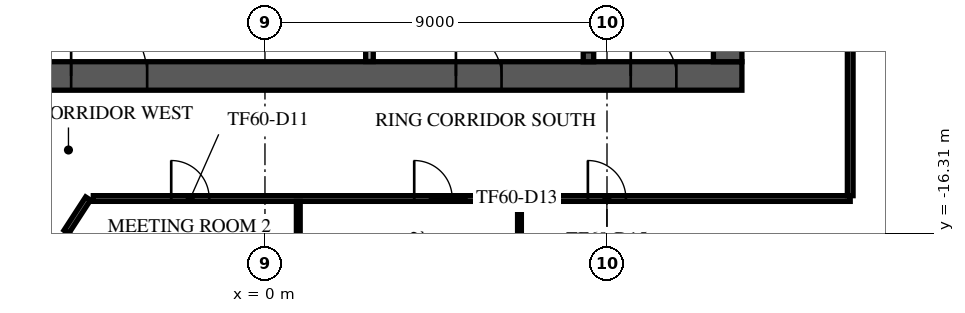
"""IFC4 building model, lengths in metres.
Left out: names, types, materials, properties, quantities, classifications, styles, units other than length and angle.
Written with IfcOpenShell. Run it as: python <this file> out.ifc"""

import sys

from ifc_helpers import new_model, si_unit, direction, frame, frame_2d, origin, place, context, subcontext, project, spatial, rectangle, extrude, element, fill, save


model = new_model("IFC4")
c1 = context("Model", 3, precision=1e-05, world=origin(), true_north=direction((0.0, 1.0)))
c2 = subcontext(c1, "Body", "Model", "MODEL_VIEW")
j1 = project(units=[si_unit("LENGTHUNIT", "METRE"), si_unit("PLANEANGLEUNIT", "RADIAN")], contexts=[c1])
p1 = place(None, origin())
s1 = spatial("IfcSite", under=j1, at=p1, CompositionType="ELEMENT")
p2 = place(p1, origin())
s2 = spatial("IfcBuilding", under=s1, at=p2, CompositionType="ELEMENT")
p3 = place(p2, frame((0.0, 0.0, 254.9)))
s3 = spatial("IfcBuildingStorey", under=s2, at=p3, CompositionType="ELEMENT", Elevation=254.9)
p4 = place(p3, frame((-12.55, -12.175, 0.0), z_axis=(0.0, 0.0, 1.0), x_axis=(1.0, 0.0, 0.0)))
e1 = element("IfcWall", 1, at=p4, inside=s3, PredefinedType="SHEAR", context=c2, shape_type="SweptSolid", body=[
    extrude(rectangle(XDim=25.1, YDim=0.75, at=frame_2d((12.55, 0.0))), origin(), (0.0, 0.0, 1.0), 3.64),
])
p5 = place(p4, frame((7.45, 0.0, 0.0)))
e2 = element("IfcOpeningElement", 2, at=p5, cuts=e1, PredefinedType="OPENING", context=c2, shape_type="SweptSolid", body=[
    extrude(rectangle(XDim=2.0, YDim=2.1, at=frame_2d((1.0, 1.05))), frame((0.0, 0.385, 0.0), z_axis=(0.0, -1.0, 0.0), x_axis=(1.0, 0.0, 0.0)), (0.0, 0.0, 1.0), 0.77),
])
p6 = place(p4, frame((17.575, 0.0, 0.0)))
e3 = element("IfcOpeningElement", 3, at=p6, cuts=e1, PredefinedType="OPENING", context=c2, shape_type="SweptSolid", body=[
    extrude(rectangle(XDim=1.2, YDim=2.1, at=frame_2d((0.6, 1.05))), frame((0.0, 0.385, 0.0), z_axis=(0.0, -1.0, 0.0), x_axis=(1.0, 0.0, 0.0)), (0.0, 0.0, 1.0), 0.77),
])
p7 = place(p4, frame((1.725, 0.0, 0.0)))
e4 = element("IfcOpeningElement", 4, at=p7, cuts=e1, PredefinedType="OPENING", context=c2, shape_type="SweptSolid", body=[
    extrude(rectangle(XDim=1.2, YDim=2.1, at=frame_2d((0.6, 1.05))), frame((0.0, 0.385, 0.0), z_axis=(0.0, -1.0, 0.0), x_axis=(1.0, 0.0, 0.0)), (0.0, 0.0, 1.0), 0.77),
])
p8 = place(p4, frame((22.175, 0.0, 0.0)))
e5 = element("IfcOpeningElement", 5, at=p8, cuts=e1, PredefinedType="OPENING", context=c2, shape_type="SweptSolid", body=[
    extrude(rectangle(XDim=1.2, YDim=2.1, at=frame_2d((0.6, 1.05))), frame((0.0, 0.385, 0.0), z_axis=(0.0, -1.0, 0.0), x_axis=(1.0, 0.0, 0.0)), (0.0, 0.0, 1.0), 0.77),
])
p9 = place(p3, frame((12.175, -11.8, 0.0), z_axis=(0.0, 0.0, 1.0), x_axis=(0.0, 1.0, 0.0)))
e6 = element("IfcWall", 6, at=p9, inside=s3, PredefinedType="SHEAR", context=c2, shape_type="SweptSolid", body=[
    extrude(rectangle(XDim=23.6, YDim=0.75, at=frame_2d((11.8, 0.0))), origin(), (0.0, 0.0, 1.0), 3.64),
])
p10 = place(p9, frame((10.6, 0.0, 0.0)))
e7 = element("IfcOpeningElement", 7, at=p10, cuts=e6, PredefinedType="OPENING", context=c2, shape_type="SweptSolid", body=[
    extrude(rectangle(XDim=2.4, YDim=2.4, at=frame_2d((1.2, 1.2))), frame((0.0, 0.385, 0.0), z_axis=(0.0, -1.0, 0.0), x_axis=(1.0, 0.0, 0.0)), (0.0, 0.0, 1.0), 0.77),
])
p11 = place(p3, frame((8.512, -4.55, 0.0), z_axis=(0.0, 0.0, 1.0), x_axis=(0.0, -1.0, 0.0)))
e8 = element("IfcWall", 8, at=p11, inside=s3, PredefinedType="SOLIDWALL", context=c2, shape_type="SweptSolid", body=[
    extrude(rectangle(XDim=7.25, YDim=0.275, at=frame_2d((3.625, 0.0))), origin(), (0.0, 0.0, 1.0), 3.64),
])
p12 = place(p11, frame((6.0, 0.0, 0.0)))
e9 = element("IfcOpeningElement", 9, at=p12, cuts=e8, PredefinedType="OPENING", context=c2, shape_type="SweptSolid", body=[
    extrude(rectangle(XDim=1.0, YDim=2.1, at=frame_2d((0.5, 1.05))), frame((0.0, 0.147, 0.0), z_axis=(0.0, -1.0, 0.0), x_axis=(1.0, 0.0, 0.0)), (0.0, 0.0, 1.0), 0.295),
])
p13 = place(p3, frame((2.75, -11.795, 0.0), z_axis=(0.0, 0.0, 1.0), x_axis=(0.0, 1.0, 0.0)))
e10 = element("IfcWall", 10, at=p13, inside=s3, PredefinedType="PARTITIONING", context=c2, shape_type="SweptSolid", body=[
    extrude(rectangle(XDim=2.99, YDim=0.2, at=frame_2d((1.495, 0.0))), origin(), (0.0, 0.0, 1.0), 3.64),
])
p14 = place(p3, frame((-31.308, -15.082, 0.0), z_axis=(0.0, 0.0, 1.0), x_axis=(0.838671071298, -0.54463825992, 0.0)))
e11 = element("IfcWall", 11, at=p14, inside=s3, PredefinedType="STANDARD", context=c2, shape_type="SweptSolid", body=[
    extrude(rectangle(XDim=36.086, YDim=0.6, at=frame_2d((18.043, 0.0))), origin(), (0.0, 0.0, 1.0), 3.64),
])
p15 = place(p14, frame((1.205, 0.0, 0.9)))
e12 = element("IfcOpeningElement", 12, at=p15, cuts=e11, PredefinedType="OPENING", context=c2, shape_type="SweptSolid", body=[
    extrude(rectangle(XDim=2.1, YDim=2.1, at=frame_2d((1.05, 1.05))), frame((0.0, 0.31, 0.0), z_axis=(0.0, -1.0, 0.0), x_axis=(1.0, 0.0, 0.0)), (0.0, 0.0, 1.0), 0.62),
])
p16 = place(p14, frame((5.716, 0.0, 0.9)))
e13 = element("IfcOpeningElement", 13, at=p16, cuts=e11, PredefinedType="OPENING", context=c2, shape_type="SweptSolid", body=[
    extrude(rectangle(XDim=2.1, YDim=2.1, at=frame_2d((1.05, 1.05))), frame((0.0, 0.31, 0.0), z_axis=(0.0, -1.0, 0.0), x_axis=(1.0, 0.0, 0.0)), (0.0, 0.0, 1.0), 0.62),
])
p17 = place(p14, frame((10.227, 0.0, 0.9)))
e14 = element("IfcOpeningElement", 14, at=p17, cuts=e11, PredefinedType="OPENING", context=c2, shape_type="SweptSolid", body=[
    extrude(rectangle(XDim=2.1, YDim=2.1, at=frame_2d((1.05, 1.05))), frame((0.0, 0.31, 0.0), z_axis=(0.0, -1.0, 0.0), x_axis=(1.0, 0.0, 0.0)), (0.0, 0.0, 1.0), 0.62),
])
p18 = place(p14, frame((14.738, 0.0, 0.9)))
e15 = element("IfcOpeningElement", 15, at=p18, cuts=e11, PredefinedType="OPENING", context=c2, shape_type="SweptSolid", body=[
    extrude(rectangle(XDim=2.1, YDim=2.1, at=frame_2d((1.05, 1.05))), frame((0.0, 0.31, 0.0), z_axis=(0.0, -1.0, 0.0), x_axis=(1.0, 0.0, 0.0)), (0.0, 0.0, 1.0), 0.62),
])
p19 = place(p14, frame((19.249, 0.0, 0.9)))
e16 = element("IfcOpeningElement", 16, at=p19, cuts=e11, PredefinedType="OPENING", context=c2, shape_type="SweptSolid", body=[
    extrude(rectangle(XDim=2.1, YDim=2.1, at=frame_2d((1.05, 1.05))), frame((0.0, 0.31, 0.0), z_axis=(0.0, -1.0, 0.0), x_axis=(1.0, 0.0, 0.0)), (0.0, 0.0, 1.0), 0.62),
])
p20 = place(p14, frame((23.759, 0.0, 0.9)))
e17 = element("IfcOpeningElement", 17, at=p20, cuts=e11, PredefinedType="OPENING", context=c2, shape_type="SweptSolid", body=[
    extrude(rectangle(XDim=2.1, YDim=2.1, at=frame_2d((1.05, 1.05))), frame((0.0, 0.31, 0.0), z_axis=(0.0, -1.0, 0.0), x_axis=(1.0, 0.0, 0.0)), (0.0, 0.0, 1.0), 0.62),
])
p21 = place(p14, frame((28.27, 0.0, 0.9)))
e18 = element("IfcOpeningElement", 18, at=p21, cuts=e11, PredefinedType="OPENING", context=c2, shape_type="SweptSolid", body=[
    extrude(rectangle(XDim=2.1, YDim=2.1, at=frame_2d((1.05, 1.05))), frame((0.0, 0.31, 0.0), z_axis=(0.0, -1.0, 0.0), x_axis=(1.0, 0.0, 0.0)), (0.0, 0.0, 1.0), 0.62),
])
p22 = place(p14, frame((32.781, 0.0, 0.9)))
e19 = element("IfcOpeningElement", 19, at=p22, cuts=e11, PredefinedType="OPENING", context=c2, shape_type="SweptSolid", body=[
    extrude(rectangle(XDim=2.1, YDim=2.1, at=frame_2d((1.05, 1.05))), frame((0.0, 0.31, 0.0), z_axis=(0.0, -1.0, 0.0), x_axis=(1.0, 0.0, 0.0)), (0.0, 0.0, 1.0), 0.62),
])
p23 = place(p3, frame((6.367, -33.16, 0.0), z_axis=(0.0, 0.0, 1.0), x_axis=(0.544637371147, 0.838671648472, 0.0)))
e20 = element("IfcWall", 20, at=p23, inside=s3, PredefinedType="STANDARD", context=c2, shape_type="SweptSolid", body=[
    extrude(rectangle(XDim=48.686, YDim=0.6, at=frame_2d((24.343, 0.0))), origin(), (0.0, 0.0, 1.0), 3.64),
])
p24 = place(p23, frame((1.213, 0.0, 0.9)))
e21 = element("IfcOpeningElement", 21, at=p24, cuts=e20, PredefinedType="OPENING", context=c2, shape_type="SweptSolid", body=[
    extrude(rectangle(XDim=2.0, YDim=2.1, at=frame_2d((1.0, 1.05))), frame((0.0, 0.31, 0.0), z_axis=(0.0, -1.0, 0.0), x_axis=(1.0, 0.0, 0.0)), (0.0, 0.0, 1.0), 0.62),
])
p25 = place(p23, frame((5.639, 0.0, 0.9)))
e22 = element("IfcOpeningElement", 22, at=p25, cuts=e20, PredefinedType="OPENING", context=c2, shape_type="SweptSolid", body=[
    extrude(rectangle(XDim=2.0, YDim=2.1, at=frame_2d((1.0, 1.05))), frame((0.0, 0.31, 0.0), z_axis=(0.0, -1.0, 0.0), x_axis=(1.0, 0.0, 0.0)), (0.0, 0.0, 1.0), 0.62),
])
p26 = place(p23, frame((14.491, 0.0, 0.9)))
e23 = element("IfcOpeningElement", 23, at=p26, cuts=e20, PredefinedType="OPENING", context=c2, shape_type="SweptSolid", body=[
    extrude(rectangle(XDim=2.0, YDim=2.1, at=frame_2d((1.0, 1.05))), frame((0.0, 0.31, 0.0), z_axis=(0.0, -1.0, 0.0), x_axis=(1.0, 0.0, 0.0)), (0.0, 0.0, 1.0), 0.62),
])
p27 = place(p23, frame((18.917, 0.0, 0.9)))
e24 = element("IfcOpeningElement", 24, at=p27, cuts=e20, PredefinedType="OPENING", context=c2, shape_type="SweptSolid", body=[
    extrude(rectangle(XDim=2.0, YDim=2.1, at=frame_2d((1.0, 1.05))), frame((0.0, 0.31, 0.0), z_axis=(0.0, -1.0, 0.0), x_axis=(1.0, 0.0, 0.0)), (0.0, 0.0, 1.0), 0.62),
])
p28 = place(p23, frame((23.343, 0.0, 0.9)))
e25 = element("IfcOpeningElement", 25, at=p28, cuts=e20, PredefinedType="OPENING", context=c2, shape_type="SweptSolid", body=[
    extrude(rectangle(XDim=2.0, YDim=2.1, at=frame_2d((1.0, 1.05))), frame((0.0, 0.31, 0.0), z_axis=(0.0, -1.0, 0.0), x_axis=(1.0, 0.0, 0.0)), (0.0, 0.0, 1.0), 0.62),
])
p29 = place(p23, frame((27.769, 0.0, 0.9)))
e26 = element("IfcOpeningElement", 26, at=p29, cuts=e20, PredefinedType="OPENING", context=c2, shape_type="SweptSolid", body=[
    extrude(rectangle(XDim=2.0, YDim=2.1, at=frame_2d((1.0, 1.05))), frame((0.0, 0.31, 0.0), z_axis=(0.0, -1.0, 0.0), x_axis=(1.0, 0.0, 0.0)), (0.0, 0.0, 1.0), 0.62),
])
p30 = place(p23, frame((32.195, 0.0, 0.9)))
e27 = element("IfcOpeningElement", 27, at=p30, cuts=e20, PredefinedType="OPENING", context=c2, shape_type="SweptSolid", body=[
    extrude(rectangle(XDim=2.0, YDim=2.1, at=frame_2d((1.0, 1.05))), frame((0.0, 0.31, 0.0), z_axis=(0.0, -1.0, 0.0), x_axis=(1.0, 0.0, 0.0)), (0.0, 0.0, 1.0), 0.62),
])
p31 = place(p23, frame((36.621, 0.0, 0.9)))
e28 = element("IfcOpeningElement", 28, at=p31, cuts=e20, PredefinedType="OPENING", context=c2, shape_type="SweptSolid", body=[
    extrude(rectangle(XDim=2.0, YDim=2.1, at=frame_2d((1.0, 1.05))), frame((0.0, 0.31, 0.0), z_axis=(0.0, -1.0, 0.0), x_axis=(1.0, 0.0, 0.0)), (0.0, 0.0, 1.0), 0.62),
])
p32 = place(p23, frame((41.047, 0.0, 0.9)))
e29 = element("IfcOpeningElement", 29, at=p32, cuts=e20, PredefinedType="OPENING", context=c2, shape_type="SweptSolid", body=[
    extrude(rectangle(XDim=2.0, YDim=2.1, at=frame_2d((1.0, 1.05))), frame((0.0, 0.31, 0.0), z_axis=(0.0, -1.0, 0.0), x_axis=(1.0, 0.0, 0.0)), (0.0, 0.0, 1.0), 0.62),
])
p33 = place(p23, frame((45.473, 0.0, 0.9)))
e30 = element("IfcOpeningElement", 30, at=p33, cuts=e20, PredefinedType="OPENING", context=c2, shape_type="SweptSolid", body=[
    extrude(rectangle(XDim=2.0, YDim=2.1, at=frame_2d((1.0, 1.05))), frame((0.0, 0.31, 0.0), z_axis=(0.0, -1.0, 0.0), x_axis=(1.0, 0.0, 0.0)), (0.0, 0.0, 1.0), 0.62),
])
p34 = place(p3, frame((-26.791, -5.221, 0.0), z_axis=(0.0, 0.0, 1.0), x_axis=(0.838671905754, -0.544636974965, 0.0)))
e31 = element("IfcWall", 31, at=p34, inside=s3, PredefinedType="PARTITIONING", context=c2, shape_type="SweptSolid", body=[
    extrude(rectangle(XDim=39.325, YDim=0.15, at=frame_2d((19.663, 0.0))), origin(), (0.0, 0.0, 1.0), 3.04),
])
p35 = place(p34, frame((2.05, 0.0, 0.0)))
e32 = element("IfcOpeningElement", 32, at=p35, cuts=e31, PredefinedType="OPENING", context=c2, shape_type="SweptSolid", body=[
    extrude(rectangle(XDim=1.0, YDim=2.1, at=frame_2d((0.5, 1.05))), frame((0.0, 0.085, 0.0), z_axis=(0.0, -1.0, 0.0), x_axis=(1.0, 0.0, 0.0)), (0.0, 0.0, 1.0), 0.17),
])
p36 = place(p34, frame((9.807, 0.0, 0.0)))
e33 = element("IfcOpeningElement", 33, at=p36, cuts=e31, PredefinedType="OPENING", context=c2, shape_type="SweptSolid", body=[
    extrude(rectangle(XDim=1.0, YDim=2.1, at=frame_2d((0.5, 1.05))), frame((0.0, 0.085, 0.0), z_axis=(0.0, -1.0, 0.0), x_axis=(1.0, 0.0, 0.0)), (0.0, 0.0, 1.0), 0.17),
])
p37 = place(p34, frame((18.866, 0.0, 0.0)))
e34 = element("IfcOpeningElement", 34, at=p37, cuts=e31, PredefinedType="OPENING", context=c2, shape_type="SweptSolid", body=[
    extrude(rectangle(XDim=1.0, YDim=2.1, at=frame_2d((0.5, 1.05))), frame((0.0, 0.085, 0.0), z_axis=(0.0, -1.0, 0.0), x_axis=(1.0, 0.0, 0.0)), (0.0, 0.0, 1.0), 0.17),
])
p38 = place(p34, frame((25.009, 0.0, 0.0)))
e35 = element("IfcOpeningElement", 35, at=p38, cuts=e31, PredefinedType="OPENING", context=c2, shape_type="SweptSolid", body=[
    extrude(rectangle(XDim=1.0, YDim=2.1, at=frame_2d((0.5, 1.05))), frame((0.0, 0.085, 0.0), z_axis=(0.0, -1.0, 0.0), x_axis=(1.0, 0.0, 0.0)), (0.0, 0.0, 1.0), 0.17),
])
p39 = place(p34, frame((36.069, 0.0, 0.0)))
e36 = element("IfcOpeningElement", 36, at=p39, cuts=e31, PredefinedType="OPENING", context=c2, shape_type="SweptSolid", body=[
    extrude(rectangle(XDim=1.8, YDim=2.1, at=frame_2d((0.9, 1.05))), frame((0.0, 0.085, 0.0), z_axis=(0.0, -1.0, 0.0), x_axis=(1.0, 0.0, 0.0)), (0.0, 0.0, 1.0), 0.17),
])
p40 = place(p3, frame((-5.265, -16.339, 0.0), z_axis=(0.0, 0.0, 1.0), x_axis=(0.838696093785, -0.544599726653, 0.0)))
e37 = element("IfcWall", 37, at=p40, inside=s3, PredefinedType="PARTITIONING", context=c2, shape_type="SweptSolid", body=[
    extrude(rectangle(XDim=15.217, YDim=0.15, at=frame_2d((7.608, 0.0))), origin(), (0.0, 0.0, 1.0), 3.24),
])
p41 = place(p3, frame((-5.224, -16.276, 0.0), z_axis=(0.0, 0.0, 1.0), x_axis=(0.544684420792, 0.838641092331, 0.0)))
e38 = element("IfcWall", 38, at=p41, inside=s3, PredefinedType="PARTITIONING", context=c2, shape_type="SweptSolid", body=[
    extrude(rectangle(XDim=1.045, YDim=0.15, at=frame_2d((0.522, 0.0))), origin(), (0.0, 0.0, 1.0), 3.24),
])
p42 = place(p3, frame((-4.517, -15.4, 0.0), z_axis=(0.0, 0.0, 1.0), x_axis=(1.0, 0.0, 0.0)))
e39 = element("IfcWall", 39, at=p42, inside=s3, PredefinedType="PARTITIONING", context=c2, shape_type="SweptSolid", body=[
    extrude(rectangle(XDim=19.917, YDim=0.15, at=frame_2d((9.958, 0.0))), origin(), (0.0, 0.0, 1.0), 3.24),
])
p43 = place(p42, frame((2.05, 0.0, 0.0)))
e40 = element("IfcOpeningElement", 40, at=p43, cuts=e39, PredefinedType="OPENING", context=c2, shape_type="SweptSolid", body=[
    extrude(rectangle(XDim=1.0, YDim=2.1, at=frame_2d((0.5, 1.05))), frame((0.0, 0.085, 0.0), z_axis=(0.0, -1.0, 0.0), x_axis=(1.0, 0.0, 0.0)), (0.0, 0.0, 1.0), 0.17),
])
p44 = place(p42, frame((8.444, 0.0, 0.0)))
e41 = element("IfcOpeningElement", 41, at=p44, cuts=e39, PredefinedType="OPENING", context=c2, shape_type="SweptSolid", body=[
    extrude(rectangle(XDim=1.0, YDim=2.1, at=frame_2d((0.5, 1.05))), frame((0.0, 0.085, 0.0), z_axis=(0.0, -1.0, 0.0), x_axis=(1.0, 0.0, 0.0)), (0.0, 0.0, 1.0), 0.17),
])
p45 = place(p42, frame((13.014, 0.0, 0.0)))
e42 = element("IfcOpeningElement", 42, at=p45, cuts=e39, PredefinedType="OPENING", context=c2, shape_type="SweptSolid", body=[
    extrude(rectangle(XDim=1.0, YDim=2.1, at=frame_2d((0.5, 1.05))), frame((0.0, 0.085, 0.0), z_axis=(0.0, -1.0, 0.0), x_axis=(1.0, 0.0, 0.0)), (0.0, 0.0, 1.0), 0.17),
])
p46 = place(p3, frame((15.4, -15.325, 0.0), z_axis=(0.0, 0.0, 1.0), x_axis=(0.0, 1.0, 0.0)))
e43 = element("IfcWall", 43, at=p46, inside=s3, PredefinedType="PARTITIONING", context=c2, shape_type="SweptSolid", body=[
    extrude(rectangle(XDim=25.082, YDim=0.15, at=frame_2d((12.541, 0.0))), origin(), (0.0, 0.0, 1.0), 3.24),
])
p47 = place(p46, frame((6.847, 0.0, 0.0)))
e44 = element("IfcOpeningElement", 44, at=p47, cuts=e43, PredefinedType="OPENING", context=c2, shape_type="SweptSolid", body=[
    extrude(rectangle(XDim=1.0, YDim=2.1, at=frame_2d((0.5, 1.05))), frame((0.0, 0.085, 0.0), z_axis=(0.0, -1.0, 0.0), x_axis=(1.0, 0.0, 0.0)), (0.0, 0.0, 1.0), 0.17),
])
p48 = place(p46, frame((13.512, 0.0, 0.0)))
e45 = element("IfcOpeningElement", 45, at=p48, cuts=e43, PredefinedType="OPENING", context=c2, shape_type="SweptSolid", body=[
    extrude(rectangle(XDim=1.0, YDim=2.1, at=frame_2d((0.5, 1.05))), frame((0.0, 0.085, 0.0), z_axis=(0.0, -1.0, 0.0), x_axis=(1.0, 0.0, 0.0)), (0.0, 0.0, 1.0), 0.17),
])
p49 = place(p3, frame((0.877, -20.205, 0.0), z_axis=(0.0, 0.0, 1.0), x_axis=(0.0, 1.0, 0.0)))
e46 = element("IfcWall", 46, at=p49, inside=s3, PredefinedType="PARTITIONING", context=c2, shape_type="SweptSolid", body=[
    extrude(rectangle(XDim=4.73, YDim=0.1, at=frame_2d((2.365, 0.0))), origin(), (0.0, 0.0, 1.0), 3.64),
])
p50 = place(p3, frame((6.697, -23.984, 0.0), z_axis=(0.0, 0.0, 1.0), x_axis=(0.0, 1.0, 0.0)))
e47 = element("IfcWall", 47, at=p50, inside=s3, PredefinedType="PARTITIONING", context=c2, shape_type="SweptSolid", body=[
    extrude(rectangle(XDim=8.509, YDim=0.1, at=frame_2d((4.254, 0.0))), origin(), (0.0, 0.0, 1.0), 3.64),
])
p51 = place(p5, origin())
e48 = element("IfcDoor", 48, at=p51, inside=s3, OperationType="SINGLE_SWING_LEFT", PredefinedType="DOOR", context=c2, shape_type="SweptSolid", body=[
    extrude(rectangle(XDim=2.0, YDim=2.1, at=frame_2d((1.0, 1.05))), frame((0.0, 0.025, 0.0), z_axis=(0.0, -1.0, 0.0), x_axis=(1.0, 0.0, 0.0)), (0.0, 0.0, 1.0), 0.05),
])
fill(e2, e48)
p52 = place(p6, origin())
e49 = element("IfcDoor", 49, at=p52, inside=s3, OperationType="SINGLE_SWING_LEFT", PredefinedType="DOOR", context=c2, shape_type="SweptSolid", body=[
    extrude(rectangle(XDim=1.2, YDim=2.1, at=frame_2d((0.6, 1.05))), frame((0.0, 0.025, 0.0), z_axis=(0.0, -1.0, 0.0), x_axis=(1.0, 0.0, 0.0)), (0.0, 0.0, 1.0), 0.05),
])
fill(e3, e49)
p53 = place(p8, origin())
e50 = element("IfcDoor", 50, at=p53, inside=s3, OperationType="SINGLE_SWING_LEFT", PredefinedType="DOOR", context=c2, shape_type="SweptSolid", body=[
    extrude(rectangle(XDim=1.2, YDim=2.1, at=frame_2d((0.6, 1.05))), frame((0.0, 0.025, 0.0), z_axis=(0.0, -1.0, 0.0), x_axis=(1.0, 0.0, 0.0)), (0.0, 0.0, 1.0), 0.05),
])
fill(e5, e50)
p54 = place(p43, frame((1.0, 0.0, 0.0), z_axis=(0.0, 0.0, 1.0), x_axis=(-1.0, 0.0, 0.0)))
e51 = element("IfcDoor", 51, at=p54, inside=s3, OperationType="SINGLE_SWING_RIGHT", PredefinedType="DOOR", context=c2, shape_type="SweptSolid", body=[
    extrude(rectangle(XDim=1.0, YDim=2.1, at=frame_2d((0.5, 1.05))), frame((0.0, 0.025, 0.0), z_axis=(0.0, -1.0, 0.0), x_axis=(1.0, 0.0, 0.0)), (0.0, 0.0, 1.0), 0.05),
])
fill(e40, e51)
p55 = place(p44, frame((1.0, 0.0, 0.0), z_axis=(0.0, 0.0, 1.0), x_axis=(-1.0, 0.0, 0.0)))
e52 = element("IfcDoor", 52, at=p55, inside=s3, OperationType="SINGLE_SWING_LEFT", PredefinedType="DOOR", context=c2, shape_type="SweptSolid", body=[
    extrude(rectangle(XDim=1.0, YDim=2.1, at=frame_2d((0.5, 1.05))), frame((0.0, 0.025, 0.0), z_axis=(0.0, -1.0, 0.0), x_axis=(1.0, 0.0, 0.0)), (0.0, 0.0, 1.0), 0.05),
])
fill(e41, e52)
p56 = place(p45, frame((1.0, 0.0, 0.0), z_axis=(0.0, 0.0, 1.0), x_axis=(-1.0, 0.0, 0.0)))
e53 = element("IfcDoor", 53, at=p56, inside=s3, OperationType="SINGLE_SWING_LEFT", PredefinedType="DOOR", context=c2, shape_type="SweptSolid", body=[
    extrude(rectangle(XDim=1.0, YDim=2.1, at=frame_2d((0.5, 1.05))), frame((0.0, 0.025, 0.0), z_axis=(0.0, -1.0, 0.0), x_axis=(1.0, 0.0, 0.0)), (0.0, 0.0, 1.0), 0.05),
])
fill(e42, e53)
save(model, sys.argv[1])
